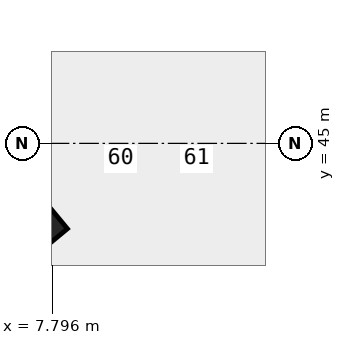
"""IFC4 building model, lengths in metres.
Left out: names, types, materials, properties, quantities, classifications, styles, units other than length and angle.
Written with IfcOpenShell. Run it as: python <this file> out.ifc"""

import sys

from ifc_helpers import new_model, si_unit, direction, frame, origin, origin_2d, place, context, subcontext, project, spatial, rectangle, extrude, element, save


model = new_model("IFC4")
c1 = context("Model", 3, precision=1e-05, world=origin(), true_north=direction((0.0, 1.0)))
c2 = subcontext(c1, "Body", "Model", "MODEL_VIEW")
j1 = project(units=[si_unit("LENGTHUNIT", "METRE"), si_unit("PLANEANGLEUNIT", "RADIAN")], contexts=[c1])
p1 = place(None, origin())
s1 = spatial("IfcSite", under=j1, at=p1, CompositionType="ELEMENT")
p2 = place(p1, origin())
s2 = spatial("IfcBuilding", under=s1, at=p2, CompositionType="ELEMENT")
p3 = place(p2, frame((0.0, 0.0, -16.5)))
s3 = spatial("IfcBuildingStorey", under=s2, at=p3, CompositionType="ELEMENT", Elevation=-16.5)
p4 = place(p3, frame((7.299, 42.144, -0.4), z_axis=(0.0, 0.0, 1.0), x_axis=(-0.637666022163, 0.770312952103, 0.0)))
e1 = element("IfcColumn", 1, at=p4, inside=s3, PredefinedType="COLUMN", context=c2, shape_type="SweptSolid", body=[
    extrude(rectangle(XDim=1.2, YDim=1.6, at=origin_2d()), origin(), (0.0, 0.0, 1.0), 5.48),
])
save(model, sys.argv[1])
